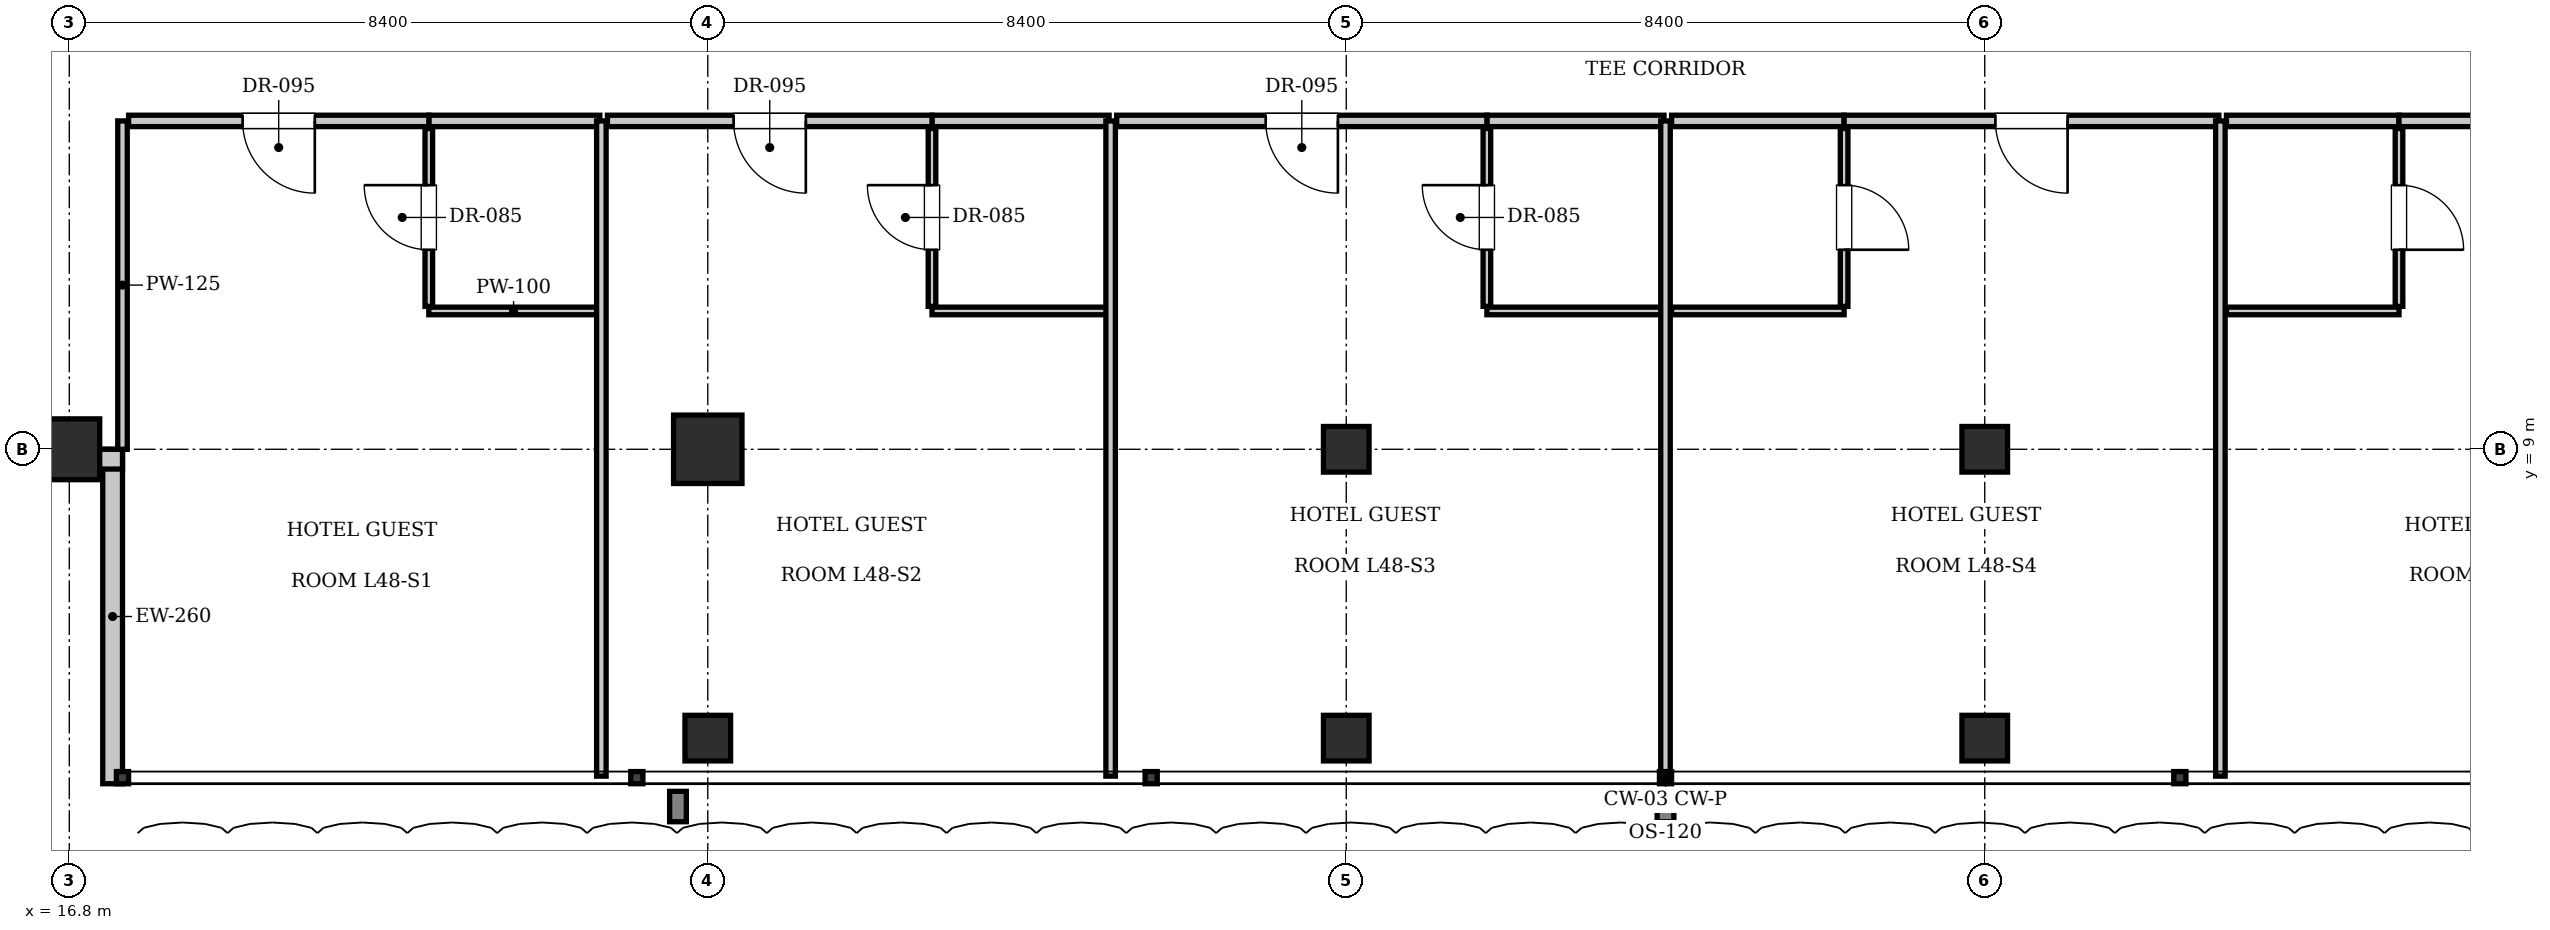
"""IFC4 building model, lengths in metres.
Left out: names, types, materials, properties, quantities, classifications, styles, units other than length and angle.
Written with IfcOpenShell. Run it as: python <this file> out.ifc"""

import sys

from ifc_helpers import new_model, si_unit, direction, frame, frame_2d, origin, origin_2d, place, context, subcontext, project, spatial, rectangle, i_section, extrude, element, fill, save


model = new_model("IFC4")
c1 = context("Model", 3, precision=1e-05, world=origin(), true_north=direction((0.0, 1.0)))
c2 = subcontext(c1, "Body", "Model", "MODEL_VIEW")
j1 = project(units=[si_unit("LENGTHUNIT", "METRE"), si_unit("PLANEANGLEUNIT", "RADIAN")], contexts=[c1])
p1 = place(None, origin())
s1 = spatial("IfcSite", under=j1, at=p1, CompositionType="ELEMENT")
p2 = place(p1, origin())
s2 = spatial("IfcBuilding", under=s1, at=p2, CompositionType="ELEMENT")
p3 = place(p2, frame((0.0, 0.0, 196.7)))
s3 = spatial("IfcBuildingStorey", under=s2, at=p3, CompositionType="ELEMENT", Elevation=196.7)
p4 = place(p3, frame((25.2, 9.0, 0.0), z_axis=(0.0, 0.0, 1.0), x_axis=(1.0, 0.0, 0.0)))
e1 = element("IfcColumn", 1, at=p4, inside=s3, PredefinedType="COLUMN", context=c2, shape_type="SweptSolid", body=[
    extrude(rectangle(XDim=0.9, YDim=0.9, at=origin_2d()), origin(), (0.0, 0.0, 1.0), 3.85),
])
for number, where, z_axis, x_axis in (
    (2, (33.6, 9.0, 0.0), (0.0, 0.0, 1.0), (1.0, 0.0, 0.0)),
    (3, (42.0, 9.0, 0.0), (0.0, 0.0, 1.0), (1.0, 0.0, 0.0)),
):
    element("IfcColumn", number, at=place(p3, frame(where, z_axis=z_axis, x_axis=x_axis)), inside=s3, PredefinedType="COLUMN", context=c2, shape_type="SweptSolid", body=[
        extrude(i_section(OverallWidth=0.6, OverallDepth=0.6, WebThickness=0.025, FlangeThickness=0.038, at=origin_2d()), origin(), (0.0, 0.0, 1.0), 3.85),
    ])
p5 = place(p3, frame((16.8, 9.0, 0.0), z_axis=(0.0, 0.0, 1.0), x_axis=(1.0, 0.0, 0.0)))
e4 = element("IfcColumn", 4, at=p5, inside=s3, PredefinedType="COLUMN", context=c2, shape_type="SweptSolid", body=[
    extrude(rectangle(XDim=0.8, YDim=0.8, at=origin_2d()), origin(), (0.0, 0.0, 1.0), 3.85),
])
for number, where, z_axis, x_axis in (
    (5, (25.2, 5.2, 0.0), (0.0, 0.0, 1.0), (1.0, 0.0, 0.0)),
    (6, (33.6, 5.2, 0.0), (0.0, 0.0, 1.0), (1.0, 0.0, 0.0)),
    (7, (42.0, 5.2, 0.0), (0.0, 0.0, 1.0), (1.0, 0.0, 0.0)),
):
    element("IfcColumn", number, at=place(p3, frame(where, z_axis=z_axis, x_axis=x_axis)), inside=s3, PredefinedType="COLUMN", context=c2, shape_type="SweptSolid", body=[
        extrude(i_section(OverallWidth=0.6, OverallDepth=0.6, WebThickness=0.025, FlangeThickness=0.038, at=origin_2d()), origin(), (0.0, 0.0, 1.0), 3.85),
    ])
p6 = place(p3, frame((17.37, 4.6, 0.0), z_axis=(0.0, 0.0, 1.0), x_axis=(0.0, 1.0, 0.0)))
e8 = element("IfcWall", 8, at=p6, inside=s3, PredefinedType="SOLIDWALL", context=c2, shape_type="SweptSolid", body=[
    extrude(rectangle(XDim=4.4, YDim=0.26, at=frame_2d((2.2, 0.0))), origin(), (0.0, 0.0, 1.0), 3.61),
])
p7 = place(p3, frame((17.5, 8.87, 0.0), z_axis=(0.0, 0.0, 1.0), x_axis=(-1.0, 0.0, 0.0)))
e9 = element("IfcWall", 9, at=p7, inside=s3, PredefinedType="SOLIDWALL", context=c2, shape_type="SweptSolid", body=[
    extrude(rectangle(XDim=4.4, YDim=0.26, at=frame_2d((2.2, 0.0))), origin(), (0.0, 0.0, 1.0), 3.071),
])
p8 = place(p7, frame((1.3, 0.0, 0.9)))
e10 = element("IfcOpeningElement", 10, at=p8, cuts=e9, PredefinedType="OPENING", context=c2, shape_type="SweptSolid", body=[
    extrude(rectangle(XDim=1.8, YDim=2.1, at=frame_2d((0.9, 1.05))), frame((0.0, 0.14, 0.0), z_axis=(0.0, -1.0, 0.0), x_axis=(1.0, 0.0, 0.0)), (0.0, 0.0, 1.0), 0.28),
])
p9 = place(p3, frame((17.5, 9.0, 0.0), z_axis=(0.0, 0.0, 1.0), x_axis=(0.0, 1.0, 0.0)))
e11 = element("IfcWall", 11, at=p9, inside=s3, PredefinedType="PARTITIONING", context=c2, shape_type="SweptSolid", body=[
    extrude(rectangle(XDim=4.32, YDim=0.125, at=frame_2d((2.16, 0.0))), origin(), (0.0, 0.0, 1.0), 3.61),
])
p10 = place(p3, frame((21.53, 13.32, 0.0), z_axis=(0.0, 0.0, 1.0), x_axis=(1.0, 0.0, 0.0)))
e12 = element("IfcWall", 12, at=p10, inside=s3, PredefinedType="PARTITIONING", context=c2, shape_type="SweptSolid", body=[
    extrude(rectangle(XDim=2.25, YDim=0.15, at=frame_2d((1.125, 0.0))), origin(), (0.0, 0.0, 1.0), 3.61),
])
p11 = place(p3, frame((21.53, 10.82, 0.0), z_axis=(0.0, 0.0, 1.0), x_axis=(1.0, 0.0, 0.0)))
e13 = element("IfcWall", 13, at=p11, inside=s3, PredefinedType="PARTITIONING", context=c2, shape_type="SweptSolid", body=[
    extrude(rectangle(XDim=2.23, YDim=0.1, at=frame_2d((1.115, 0.0))), origin(), (0.0, 0.0, 1.0), 3.61),
])
p12 = place(p3, frame((21.53, 10.88, 0.0), z_axis=(0.0, 0.0, 1.0), x_axis=(0.0, 1.0, 0.0)))
e14 = element("IfcWall", 14, at=p12, inside=s3, PredefinedType="PARTITIONING", context=c2, shape_type="SweptSolid", body=[
    extrude(rectangle(XDim=2.34, YDim=0.1, at=frame_2d((1.17, 0.0))), origin(), (0.0, 0.0, 1.0), 3.61),
])
p13 = place(p12, frame((0.745, 0.0, 0.0)))
e15 = element("IfcOpeningElement", 15, at=p13, cuts=e14, PredefinedType="OPENING", context=c2, shape_type="SweptSolid", body=[
    extrude(rectangle(XDim=0.85, YDim=2.1, at=frame_2d((0.425, 1.05))), frame((0.0, 0.06, 0.0), z_axis=(0.0, -1.0, 0.0), x_axis=(1.0, 0.0, 0.0)), (0.0, 0.0, 1.0), 0.12),
])
p14 = place(p3, frame((17.58, 13.32, 0.0), z_axis=(0.0, 0.0, 1.0), x_axis=(1.0, 0.0, 0.0)))
e16 = element("IfcWall", 16, at=p14, inside=s3, PredefinedType="PARTITIONING", context=c2, shape_type="SweptSolid", body=[
    extrude(rectangle(XDim=3.95, YDim=0.15, at=frame_2d((1.975, 0.0))), origin(), (0.0, 0.0, 1.0), 3.61),
])
p15 = place(p14, frame((1.5, 0.0, 0.0)))
e17 = element("IfcOpeningElement", 17, at=p15, cuts=e16, PredefinedType="OPENING", context=c2, shape_type="SweptSolid", body=[
    extrude(rectangle(XDim=0.95, YDim=2.15, at=frame_2d((0.475, 1.075))), frame((0.0, 0.085, 0.0), z_axis=(0.0, -1.0, 0.0), x_axis=(1.0, 0.0, 0.0)), (0.0, 0.0, 1.0), 0.17),
])
p16 = place(p3, frame((23.8, 4.7, 0.0), z_axis=(0.0, 0.0, 1.0), x_axis=(0.0, 1.0, 0.0)))
e18 = element("IfcWall", 18, at=p16, inside=s3, PredefinedType="PARTITIONING", context=c2, shape_type="SweptSolid", body=[
    extrude(rectangle(XDim=8.62, YDim=0.125, at=frame_2d((4.31, 0.0))), origin(), (0.0, 0.0, 1.0), 3.61),
])
p17 = place(p3, frame((28.15, 13.32, 0.0), z_axis=(0.0, 0.0, 1.0), x_axis=(1.0, 0.0, 0.0)))
e19 = element("IfcWall", 19, at=p17, inside=s3, PredefinedType="PARTITIONING", context=c2, shape_type="SweptSolid", body=[
    extrude(rectangle(XDim=2.33, YDim=0.15, at=frame_2d((1.165, 0.0))), origin(), (0.0, 0.0, 1.0), 3.61),
])
p18 = place(p3, frame((28.15, 10.82, 0.0), z_axis=(0.0, 0.0, 1.0), x_axis=(1.0, 0.0, 0.0)))
e20 = element("IfcWall", 20, at=p18, inside=s3, PredefinedType="PARTITIONING", context=c2, shape_type="SweptSolid", body=[
    extrude(rectangle(XDim=2.31, YDim=0.1, at=frame_2d((1.155, 0.0))), origin(), (0.0, 0.0, 1.0), 3.61),
])
p19 = place(p3, frame((28.15, 10.88, 0.0), z_axis=(0.0, 0.0, 1.0), x_axis=(0.0, 1.0, 0.0)))
e21 = element("IfcWall", 21, at=p19, inside=s3, PredefinedType="PARTITIONING", context=c2, shape_type="SweptSolid", body=[
    extrude(rectangle(XDim=2.34, YDim=0.1, at=frame_2d((1.17, 0.0))), origin(), (0.0, 0.0, 1.0), 3.61),
])
p20 = place(p19, frame((0.745, 0.0, 0.0)))
e22 = element("IfcOpeningElement", 22, at=p20, cuts=e21, PredefinedType="OPENING", context=c2, shape_type="SweptSolid", body=[
    extrude(rectangle(XDim=0.85, YDim=2.1, at=frame_2d((0.425, 1.05))), frame((0.0, 0.06, 0.0), z_axis=(0.0, -1.0, 0.0), x_axis=(1.0, 0.0, 0.0)), (0.0, 0.0, 1.0), 0.12),
])
p21 = place(p3, frame((23.88, 13.32, 0.0), z_axis=(0.0, 0.0, 1.0), x_axis=(1.0, 0.0, 0.0)))
e23 = element("IfcWall", 23, at=p21, inside=s3, PredefinedType="PARTITIONING", context=c2, shape_type="SweptSolid", body=[
    extrude(rectangle(XDim=4.27, YDim=0.15, at=frame_2d((2.135, 0.0))), origin(), (0.0, 0.0, 1.0), 3.61),
])
p22 = place(p21, frame((1.66, 0.0, 0.0)))
e24 = element("IfcOpeningElement", 24, at=p22, cuts=e23, PredefinedType="OPENING", context=c2, shape_type="SweptSolid", body=[
    extrude(rectangle(XDim=0.95, YDim=2.15, at=frame_2d((0.475, 1.075))), frame((0.0, 0.085, 0.0), z_axis=(0.0, -1.0, 0.0), x_axis=(1.0, 0.0, 0.0)), (0.0, 0.0, 1.0), 0.17),
])
p23 = place(p3, frame((30.5, 4.7, 0.0), z_axis=(0.0, 0.0, 1.0), x_axis=(0.0, 1.0, 0.0)))
e25 = element("IfcWall", 25, at=p23, inside=s3, PredefinedType="PARTITIONING", context=c2, shape_type="SweptSolid", body=[
    extrude(rectangle(XDim=8.62, YDim=0.125, at=frame_2d((4.31, 0.0))), origin(), (0.0, 0.0, 1.0), 3.61),
])
p24 = place(p3, frame((35.45, 13.32, 0.0), z_axis=(0.0, 0.0, 1.0), x_axis=(1.0, 0.0, 0.0)))
e26 = element("IfcWall", 26, at=p24, inside=s3, PredefinedType="PARTITIONING", context=c2, shape_type="SweptSolid", body=[
    extrude(rectangle(XDim=2.33, YDim=0.15, at=frame_2d((1.165, 0.0))), origin(), (0.0, 0.0, 1.0), 3.61),
])
p25 = place(p3, frame((35.45, 10.82, 0.0), z_axis=(0.0, 0.0, 1.0), x_axis=(1.0, 0.0, 0.0)))
e27 = element("IfcWall", 27, at=p25, inside=s3, PredefinedType="PARTITIONING", context=c2, shape_type="SweptSolid", body=[
    extrude(rectangle(XDim=2.31, YDim=0.1, at=frame_2d((1.155, 0.0))), origin(), (0.0, 0.0, 1.0), 3.61),
])
p26 = place(p3, frame((35.45, 10.88, 0.0), z_axis=(0.0, 0.0, 1.0), x_axis=(0.0, 1.0, 0.0)))
e28 = element("IfcWall", 28, at=p26, inside=s3, PredefinedType="PARTITIONING", context=c2, shape_type="SweptSolid", body=[
    extrude(rectangle(XDim=2.34, YDim=0.1, at=frame_2d((1.17, 0.0))), origin(), (0.0, 0.0, 1.0), 3.61),
])
p27 = place(p26, frame((0.745, 0.0, 0.0)))
e29 = element("IfcOpeningElement", 29, at=p27, cuts=e28, PredefinedType="OPENING", context=c2, shape_type="SweptSolid", body=[
    extrude(rectangle(XDim=0.85, YDim=2.1, at=frame_2d((0.425, 1.05))), frame((0.0, 0.06, 0.0), z_axis=(0.0, -1.0, 0.0), x_axis=(1.0, 0.0, 0.0)), (0.0, 0.0, 1.0), 0.12),
])
p28 = place(p3, frame((30.58, 13.32, 0.0), z_axis=(0.0, 0.0, 1.0), x_axis=(1.0, 0.0, 0.0)))
e30 = element("IfcWall", 30, at=p28, inside=s3, PredefinedType="PARTITIONING", context=c2, shape_type="SweptSolid", body=[
    extrude(rectangle(XDim=4.87, YDim=0.15, at=frame_2d((2.435, 0.0))), origin(), (0.0, 0.0, 1.0), 3.61),
])
p29 = place(p28, frame((1.96, 0.0, 0.0)))
e31 = element("IfcOpeningElement", 31, at=p29, cuts=e30, PredefinedType="OPENING", context=c2, shape_type="SweptSolid", body=[
    extrude(rectangle(XDim=0.95, YDim=2.15, at=frame_2d((0.475, 1.075))), frame((0.0, 0.085, 0.0), z_axis=(0.0, -1.0, 0.0), x_axis=(1.0, 0.0, 0.0)), (0.0, 0.0, 1.0), 0.17),
])
p30 = place(p3, frame((37.8, 4.7, 0.0), z_axis=(0.0, 0.0, 1.0), x_axis=(0.0, 1.0, 0.0)))
e32 = element("IfcWall", 32, at=p30, inside=s3, PredefinedType="PARTITIONING", context=c2, shape_type="SweptSolid", body=[
    extrude(rectangle(XDim=8.62, YDim=0.125, at=frame_2d((4.31, 0.0))), origin(), (0.0, 0.0, 1.0), 3.344),
])
p31 = place(p3, frame((37.88, 13.32, 0.0), z_axis=(0.0, 0.0, 1.0), x_axis=(1.0, 0.0, 0.0)))
e33 = element("IfcWall", 33, at=p31, inside=s3, PredefinedType="PARTITIONING", context=c2, shape_type="SweptSolid", body=[
    extrude(rectangle(XDim=2.27, YDim=0.15, at=frame_2d((1.135, 0.0))), origin(), (0.0, 0.0, 1.0), 3.61),
])
p32 = place(p3, frame((37.88, 10.82, 0.0), z_axis=(0.0, 0.0, 1.0), x_axis=(1.0, 0.0, 0.0)))
e34 = element("IfcWall", 34, at=p32, inside=s3, PredefinedType="PARTITIONING", context=c2, shape_type="SweptSolid", body=[
    extrude(rectangle(XDim=2.27, YDim=0.1, at=frame_2d((1.135, 0.0))), origin(), (0.0, 0.0, 1.0), 3.61),
])
p33 = place(p3, frame((40.15, 10.88, 0.0), z_axis=(0.0, 0.0, 1.0), x_axis=(0.0, 1.0, 0.0)))
e35 = element("IfcWall", 35, at=p33, inside=s3, PredefinedType="PARTITIONING", context=c2, shape_type="SweptSolid", body=[
    extrude(rectangle(XDim=2.34, YDim=0.1, at=frame_2d((1.17, 0.0))), origin(), (0.0, 0.0, 1.0), 3.61),
])
p34 = place(p33, frame((0.745, 0.0, 0.0)))
e36 = element("IfcOpeningElement", 36, at=p34, cuts=e35, PredefinedType="OPENING", context=c2, shape_type="SweptSolid", body=[
    extrude(rectangle(XDim=0.85, YDim=2.1, at=frame_2d((0.425, 1.05))), frame((0.0, 0.06, 0.0), z_axis=(0.0, -1.0, 0.0), x_axis=(1.0, 0.0, 0.0)), (0.0, 0.0, 1.0), 0.12),
])
p35 = place(p3, frame((40.15, 13.32, 0.0), z_axis=(0.0, 0.0, 1.0), x_axis=(1.0, 0.0, 0.0)))
e37 = element("IfcWall", 37, at=p35, inside=s3, PredefinedType="PARTITIONING", context=c2, shape_type="SweptSolid", body=[
    extrude(rectangle(XDim=4.93, YDim=0.15, at=frame_2d((2.465, 0.0))), origin(), (0.0, 0.0, 1.0), 3.61),
])
p36 = place(p35, frame((1.99, 0.0, 0.0)))
e38 = element("IfcOpeningElement", 38, at=p36, cuts=e37, PredefinedType="OPENING", context=c2, shape_type="SweptSolid", body=[
    extrude(rectangle(XDim=0.95, YDim=2.15, at=frame_2d((0.475, 1.075))), frame((0.0, 0.085, 0.0), z_axis=(0.0, -1.0, 0.0), x_axis=(1.0, 0.0, 0.0)), (0.0, 0.0, 1.0), 0.17),
])
p37 = place(p3, frame((45.1, 4.7, 0.0), z_axis=(0.0, 0.0, 1.0), x_axis=(0.0, 1.0, 0.0)))
e39 = element("IfcWall", 39, at=p37, inside=s3, PredefinedType="PARTITIONING", context=c2, shape_type="SweptSolid", body=[
    extrude(rectangle(XDim=8.62, YDim=0.125, at=frame_2d((4.31, 0.0))), origin(), (0.0, 0.0, 1.0), 3.61),
])
p38 = place(p3, frame((45.18, 13.32, 0.0), z_axis=(0.0, 0.0, 1.0), x_axis=(1.0, 0.0, 0.0)))
e40 = element("IfcWall", 40, at=p38, inside=s3, PredefinedType="PARTITIONING", context=c2, shape_type="SweptSolid", body=[
    extrude(rectangle(XDim=2.27, YDim=0.15, at=frame_2d((1.135, 0.0))), origin(), (0.0, 0.0, 1.0), 3.61),
])
p39 = place(p3, frame((45.18, 10.82, 0.0), z_axis=(0.0, 0.0, 1.0), x_axis=(1.0, 0.0, 0.0)))
e41 = element("IfcWall", 41, at=p39, inside=s3, PredefinedType="PARTITIONING", context=c2, shape_type="SweptSolid", body=[
    extrude(rectangle(XDim=2.27, YDim=0.1, at=frame_2d((1.135, 0.0))), origin(), (0.0, 0.0, 1.0), 3.61),
])
p40 = place(p3, frame((47.45, 10.88, 0.0), z_axis=(0.0, 0.0, 1.0), x_axis=(0.0, 1.0, 0.0)))
e42 = element("IfcWall", 42, at=p40, inside=s3, PredefinedType="PARTITIONING", context=c2, shape_type="SweptSolid", body=[
    extrude(rectangle(XDim=2.34, YDim=0.1, at=frame_2d((1.17, 0.0))), origin(), (0.0, 0.0, 1.0), 3.61),
])
p41 = place(p40, frame((0.745, 0.0, 0.0)))
e43 = element("IfcOpeningElement", 43, at=p41, cuts=e42, PredefinedType="OPENING", context=c2, shape_type="SweptSolid", body=[
    extrude(rectangle(XDim=0.85, YDim=2.1, at=frame_2d((0.425, 1.05))), frame((0.0, 0.06, 0.0), z_axis=(0.0, -1.0, 0.0), x_axis=(1.0, 0.0, 0.0)), (0.0, 0.0, 1.0), 0.12),
])
p42 = place(p3, frame((47.45, 13.32, 0.0), z_axis=(0.0, 0.0, 1.0), x_axis=(1.0, 0.0, 0.0)))
e44 = element("IfcWall", 44, at=p42, inside=s3, PredefinedType="PARTITIONING", context=c2, shape_type="SweptSolid", body=[
    extrude(rectangle(XDim=4.33, YDim=0.15, at=frame_2d((2.165, 0.0))), origin(), (0.0, 0.0, 1.0), 3.61),
])
p43 = place(p42, frame((1.69, 0.0, 0.0)))
e45 = element("IfcOpeningElement", 45, at=p43, cuts=e44, PredefinedType="OPENING", context=c2, shape_type="SweptSolid", body=[
    extrude(rectangle(XDim=0.95, YDim=2.15, at=frame_2d((0.475, 1.075))), frame((0.0, 0.085, 0.0), z_axis=(0.0, -1.0, 0.0), x_axis=(1.0, 0.0, 0.0)), (0.0, 0.0, 1.0), 0.17),
])
p44 = place(p13, origin())
e46 = element("IfcDoor", 46, at=p44, inside=s3, OperationType="SINGLE_SWING_RIGHT", PredefinedType="DOOR", context=c2, shape_type="SweptSolid", body=[
    extrude(rectangle(XDim=0.85, YDim=2.1, at=frame_2d((0.425, 1.05))), frame((0.0, 0.025, 0.0), z_axis=(0.0, -1.0, 0.0), x_axis=(1.0, 0.0, 0.0)), (0.0, 0.0, 1.0), 0.05),
])
fill(e15, e46)
p45 = place(p15, frame((0.95, 0.0, 0.0), z_axis=(0.0, 0.0, 1.0), x_axis=(-1.0, 0.0, 0.0)))
e47 = element("IfcDoor", 47, at=p45, inside=s3, OperationType="SINGLE_SWING_LEFT", PredefinedType="DOOR", context=c2, shape_type="SweptSolid", body=[
    extrude(rectangle(XDim=0.95, YDim=2.15, at=frame_2d((0.475, 1.075))), frame((0.0, 0.025, 0.0), z_axis=(0.0, -1.0, 0.0), x_axis=(1.0, 0.0, 0.0)), (0.0, 0.0, 1.0), 0.05),
])
fill(e17, e47)
p46 = place(p20, origin())
e48 = element("IfcDoor", 48, at=p46, inside=s3, OperationType="SINGLE_SWING_RIGHT", PredefinedType="DOOR", context=c2, shape_type="SweptSolid", body=[
    extrude(rectangle(XDim=0.85, YDim=2.1, at=frame_2d((0.425, 1.05))), frame((0.0, 0.025, 0.0), z_axis=(0.0, -1.0, 0.0), x_axis=(1.0, 0.0, 0.0)), (0.0, 0.0, 1.0), 0.05),
])
fill(e22, e48)
p47 = place(p22, frame((0.95, 0.0, 0.0), z_axis=(0.0, 0.0, 1.0), x_axis=(-1.0, 0.0, 0.0)))
e49 = element("IfcDoor", 49, at=p47, inside=s3, OperationType="SINGLE_SWING_LEFT", PredefinedType="DOOR", context=c2, shape_type="SweptSolid", body=[
    extrude(rectangle(XDim=0.95, YDim=2.15, at=frame_2d((0.475, 1.075))), frame((0.0, 0.025, 0.0), z_axis=(0.0, -1.0, 0.0), x_axis=(1.0, 0.0, 0.0)), (0.0, 0.0, 1.0), 0.05),
])
fill(e24, e49)
p48 = place(p27, origin())
e50 = element("IfcDoor", 50, at=p48, inside=s3, OperationType="SINGLE_SWING_RIGHT", PredefinedType="DOOR", context=c2, shape_type="SweptSolid", body=[
    extrude(rectangle(XDim=0.85, YDim=2.1, at=frame_2d((0.425, 1.05))), frame((0.0, 0.025, 0.0), z_axis=(0.0, -1.0, 0.0), x_axis=(1.0, 0.0, 0.0)), (0.0, 0.0, 1.0), 0.05),
])
fill(e29, e50)
p49 = place(p29, frame((0.95, 0.0, 0.0), z_axis=(0.0, 0.0, 1.0), x_axis=(-1.0, 0.0, 0.0)))
e51 = element("IfcDoor", 51, at=p49, inside=s3, OperationType="SINGLE_SWING_LEFT", PredefinedType="DOOR", context=c2, shape_type="SweptSolid", body=[
    extrude(rectangle(XDim=0.95, YDim=2.15, at=frame_2d((0.475, 1.075))), frame((0.0, 0.025, 0.0), z_axis=(0.0, -1.0, 0.0), x_axis=(1.0, 0.0, 0.0)), (0.0, 0.0, 1.0), 0.05),
])
fill(e31, e51)
p50 = place(p34, frame((0.85, 0.0, 0.0), z_axis=(0.0, 0.0, 1.0), x_axis=(-1.0, 0.0, 0.0)))
e52 = element("IfcDoor", 52, at=p50, inside=s3, OperationType="SINGLE_SWING_RIGHT", PredefinedType="DOOR", context=c2, shape_type="SweptSolid", body=[
    extrude(rectangle(XDim=0.85, YDim=2.1, at=frame_2d((0.425, 1.05))), frame((0.0, 0.025, 0.0), z_axis=(0.0, -1.0, 0.0), x_axis=(1.0, 0.0, 0.0)), (0.0, 0.0, 1.0), 0.05),
])
fill(e36, e52)
p51 = place(p36, frame((0.95, 0.0, 0.0), z_axis=(0.0, 0.0, 1.0), x_axis=(-1.0, 0.0, 0.0)))
e53 = element("IfcDoor", 53, at=p51, inside=s3, OperationType="SINGLE_SWING_LEFT", PredefinedType="DOOR", context=c2, shape_type="SweptSolid", body=[
    extrude(rectangle(XDim=0.95, YDim=2.15, at=frame_2d((0.475, 1.075))), frame((0.0, 0.025, 0.0), z_axis=(0.0, -1.0, 0.0), x_axis=(1.0, 0.0, 0.0)), (0.0, 0.0, 1.0), 0.05),
])
fill(e38, e53)
p52 = place(p41, frame((0.85, 0.0, 0.0), z_axis=(0.0, 0.0, 1.0), x_axis=(-1.0, 0.0, 0.0)))
e54 = element("IfcDoor", 54, at=p52, inside=s3, OperationType="SINGLE_SWING_RIGHT", PredefinedType="DOOR", context=c2, shape_type="SweptSolid", body=[
    extrude(rectangle(XDim=0.85, YDim=2.1, at=frame_2d((0.425, 1.05))), frame((0.0, 0.025, 0.0), z_axis=(0.0, -1.0, 0.0), x_axis=(1.0, 0.0, 0.0)), (0.0, 0.0, 1.0), 0.05),
])
fill(e43, e54)
save(model, sys.argv[1])
